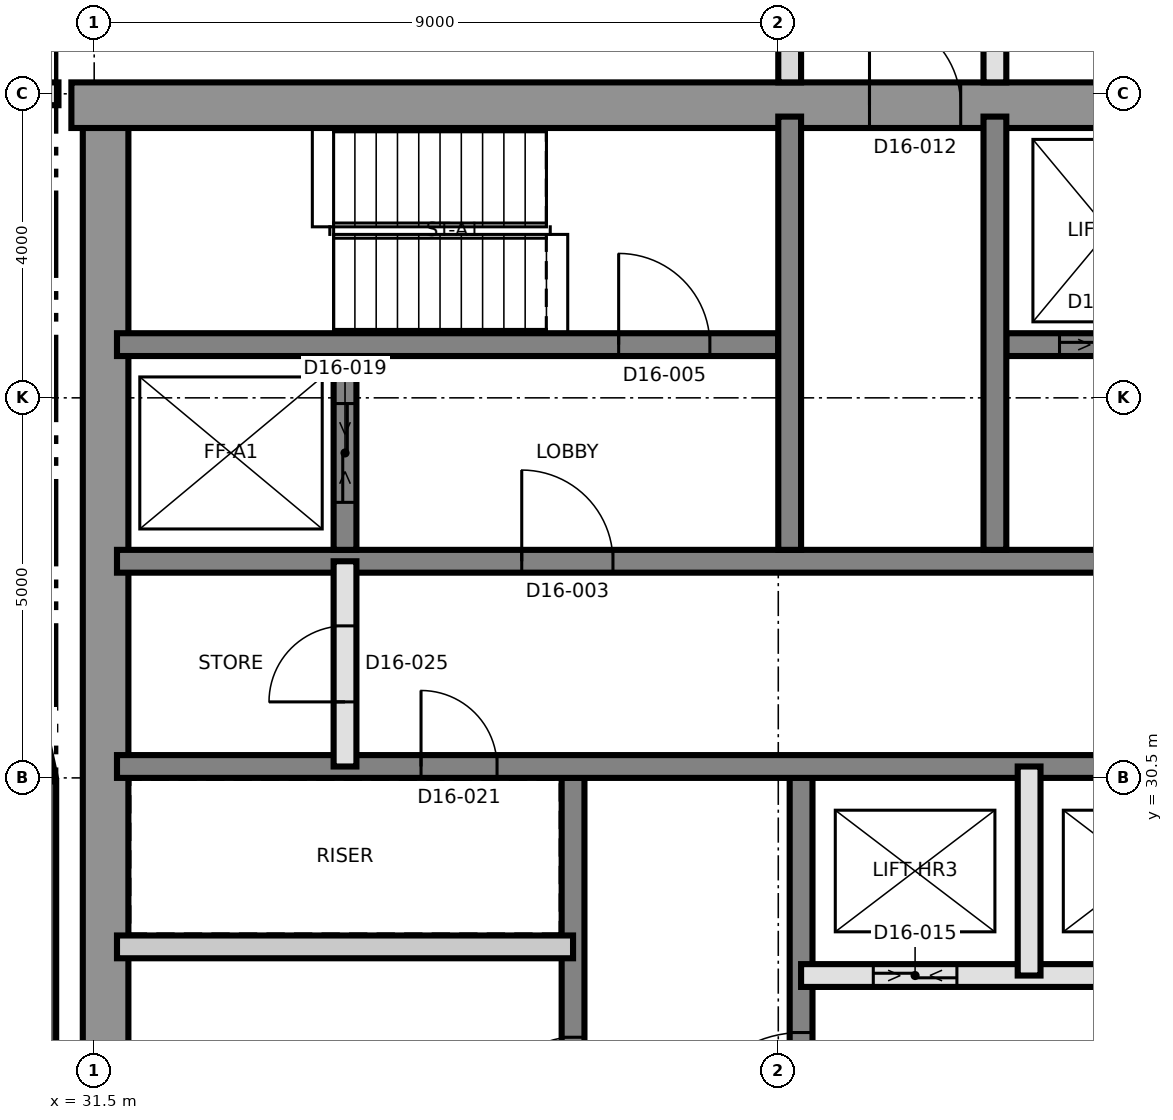
"""IFC4 building model, lengths in metres.
Left out: names, types, materials, properties, quantities, classifications, styles, units other than length and angle.
Written with IfcOpenShell. Run it as: python <this file> out.ifc"""

import sys

from ifc_helpers import new_model, si_unit, direction, frame, frame_2d, origin, place, context, subcontext, project, spatial, rectangle, extrude, element, fill, save


model = new_model("IFC4")
c1 = context("Model", 3, precision=1e-05, world=origin(), true_north=direction((0.0, 1.0)))
c2 = subcontext(c1, "Body", "Model", "MODEL_VIEW")
j1 = project(units=[si_unit("LENGTHUNIT", "METRE"), si_unit("PLANEANGLEUNIT", "RADIAN")], contexts=[c1])
p1 = place(None, origin())
s1 = spatial("IfcSite", under=j1, at=p1, CompositionType="ELEMENT")
p2 = place(p1, origin())
s2 = spatial("IfcBuilding", under=s1, at=p2, CompositionType="ELEMENT")
p3 = place(p2, frame((0.0, 0.0, 164.4)))
s3 = spatial("IfcBuildingStorey", under=s2, at=p3, CompositionType="ELEMENT", Elevation=164.4)
p4 = place(p3, frame((31.65, 21.8, 0.0), z_axis=(0.0, 0.0, 1.0), x_axis=(0.0, 1.0, 0.0)))
e1 = element("IfcWall", 1, at=p4, inside=s3, PredefinedType="SHEAR", context=c2, shape_type="SweptSolid", body=[
    extrude(rectangle(XDim=17.4, YDim=0.6, at=frame_2d((8.7, 0.0))), origin(), (0.0, 0.0, 1.0), 3.7),
])
p5 = place(p3, frame((31.2, 39.35, 0.0), z_axis=(0.0, 0.0, 1.0), x_axis=(1.0, 0.0, 0.0)))
e2 = element("IfcWall", 2, at=p5, inside=s3, PredefinedType="SHEAR", context=c2, shape_type="SweptSolid", body=[
    extrude(rectangle(XDim=27.0, YDim=0.6, at=frame_2d((13.5, 0.0))), origin(), (0.0, 0.0, 1.0), 3.7),
])
p6 = place(p5, frame((10.5, 0.0, 0.0)))
e3 = element("IfcOpeningElement", 3, at=p6, cuts=e2, PredefinedType="OPENING", context=c2, shape_type="SweptSolid", body=[
    extrude(rectangle(XDim=1.2, YDim=2.1, at=frame_2d((0.6, 1.05))), frame((0.0, 0.31, 0.0), z_axis=(0.0, -1.0, 0.0), x_axis=(1.0, 0.0, 0.0)), (0.0, 0.0, 1.0), 0.62),
])
p7 = place(p3, frame((37.8, 21.8, 0.0), z_axis=(0.0, 0.0, 1.0), x_axis=(0.0, 1.0, 0.0)))
e4 = element("IfcWall", 4, at=p7, inside=s3, PredefinedType="SHEAR", context=c2, shape_type="SweptSolid", body=[
    extrude(rectangle(XDim=8.7, YDim=0.3, at=frame_2d((4.35, 0.0))), origin(), (0.0, 0.0, 1.0), 3.7),
])
p8 = place(p7, frame((4.288, 0.0, 0.0)))
e5 = element("IfcOpeningElement", 5, at=p8, cuts=e4, PredefinedType="OPENING", context=c2, shape_type="SweptSolid", body=[
    extrude(rectangle(XDim=1.0, YDim=2.1, at=frame_2d((0.5, 1.05))), frame((0.0, 0.16, 0.0), z_axis=(0.0, -1.0, 0.0), x_axis=(1.0, 0.0, 0.0)), (0.0, 0.0, 1.0), 0.32),
])
p9 = place(p3, frame((40.8, 21.8, 0.0), z_axis=(0.0, 0.0, 1.0), x_axis=(0.0, 1.0, 0.0)))
e6 = element("IfcWall", 6, at=p9, inside=s3, PredefinedType="SHEAR", context=c2, shape_type="SweptSolid", body=[
    extrude(rectangle(XDim=8.7, YDim=0.3, at=frame_2d((4.35, 0.0))), origin(), (0.0, 0.0, 1.0), 3.7),
])
p10 = place(p9, frame((3.85, 0.0, 0.0)))
e7 = element("IfcOpeningElement", 7, at=p10, cuts=e6, PredefinedType="OPENING", context=c2, shape_type="SweptSolid", body=[
    extrude(rectangle(XDim=1.5, YDim=2.1, at=frame_2d((0.75, 1.05))), frame((0.0, 0.16, 0.0), z_axis=(0.0, -1.0, 0.0), x_axis=(1.0, 0.0, 0.0)), (0.0, 0.0, 1.0), 0.32),
])
p11 = place(p3, frame((31.8, 30.65, 0.0), z_axis=(0.0, 0.0, 1.0), x_axis=(1.0, 0.0, 0.0)))
e8 = element("IfcWall", 8, at=p11, inside=s3, PredefinedType="SHEAR", context=c2, shape_type="SweptSolid", body=[
    extrude(rectangle(XDim=26.4, YDim=0.3, at=frame_2d((13.2, 0.0))), origin(), (0.0, 0.0, 1.0), 3.7),
])
p12 = place(p11, frame((24.7, 0.0, 0.0)))
e9 = element("IfcOpeningElement", 9, at=p12, cuts=e8, PredefinedType="OPENING", context=c2, shape_type="SweptSolid", body=[
    extrude(rectangle(XDim=1.0, YDim=2.1, at=frame_2d((0.5, 1.05))), frame((0.0, 0.16, 0.0), z_axis=(0.0, -1.0, 0.0), x_axis=(1.0, 0.0, 0.0)), (0.0, 0.0, 1.0), 0.32),
])
p13 = place(p11, frame((4.0, 0.0, 0.0)))
e10 = element("IfcOpeningElement", 10, at=p13, cuts=e8, PredefinedType="OPENING", context=c2, shape_type="SweptSolid", body=[
    extrude(rectangle(XDim=1.0, YDim=2.1, at=frame_2d((0.5, 1.05))), frame((0.0, 0.16, 0.0), z_axis=(0.0, -1.0, 0.0), x_axis=(1.0, 0.0, 0.0)), (0.0, 0.0, 1.0), 0.32),
])
p14 = place(p3, frame((31.8, 33.35, 0.0), z_axis=(0.0, 0.0, 1.0), x_axis=(1.0, 0.0, 0.0)))
e11 = element("IfcWall", 11, at=p14, inside=s3, PredefinedType="SHEAR", context=c2, shape_type="SweptSolid", body=[
    extrude(rectangle(XDim=26.4, YDim=0.3, at=frame_2d((13.2, 0.0))), origin(), (0.0, 0.0, 1.0), 3.7),
])
p15 = place(p14, frame((13.85, 0.0, 0.0)))
e12 = element("IfcOpeningElement", 12, at=p15, cuts=e11, PredefinedType="OPENING", context=c2, shape_type="SweptSolid", body=[
    extrude(rectangle(XDim=1.4, YDim=2.1, at=frame_2d((0.7, 1.05))), frame((0.0, 0.16, 0.0), z_axis=(0.0, -1.0, 0.0), x_axis=(1.0, 0.0, 0.0)), (0.0, 0.0, 1.0), 0.32),
])
p16 = place(p14, frame((5.325, 0.0, 0.0)))
e13 = element("IfcOpeningElement", 13, at=p16, cuts=e11, PredefinedType="OPENING", context=c2, shape_type="SweptSolid", body=[
    extrude(rectangle(XDim=1.2, YDim=2.1, at=frame_2d((0.6, 1.05))), frame((0.0, 0.16, 0.0), z_axis=(0.0, -1.0, 0.0), x_axis=(1.0, 0.0, 0.0)), (0.0, 0.0, 1.0), 0.32),
])
p17 = place(p14, frame((19.875, 0.0, 0.0)))
e14 = element("IfcOpeningElement", 14, at=p17, cuts=e11, PredefinedType="OPENING", context=c2, shape_type="SweptSolid", body=[
    extrude(rectangle(XDim=1.2, YDim=2.1, at=frame_2d((0.6, 1.05))), frame((0.0, 0.16, 0.0), z_axis=(0.0, -1.0, 0.0), x_axis=(1.0, 0.0, 0.0)), (0.0, 0.0, 1.0), 0.32),
])
p18 = place(p3, frame((31.8, 36.2, 0.0), z_axis=(0.0, 0.0, 1.0), x_axis=(1.0, 0.0, 0.0)))
e15 = element("IfcWall", 15, at=p18, inside=s3, PredefinedType="SHEAR", context=c2, shape_type="SweptSolid", body=[
    extrude(rectangle(XDim=8.7, YDim=0.3, at=frame_2d((4.35, 0.0))), origin(), (0.0, 0.0, 1.0), 3.7),
])
p19 = place(p18, frame((6.6, 0.0, 0.0)))
e16 = element("IfcOpeningElement", 16, at=p19, cuts=e15, PredefinedType="OPENING", context=c2, shape_type="SweptSolid", body=[
    extrude(rectangle(XDim=1.2, YDim=2.1, at=frame_2d((0.6, 1.05))), frame((0.0, 0.16, 0.0), z_axis=(0.0, -1.0, 0.0), x_axis=(1.0, 0.0, 0.0)), (0.0, 0.0, 1.0), 0.32),
])
p20 = place(p3, frame((43.5, 36.2, 0.0), z_axis=(0.0, 0.0, 1.0), x_axis=(1.0, 0.0, 0.0)))
e17 = element("IfcWall", 17, at=p20, inside=s3, PredefinedType="SHEAR", context=c2, shape_type="SweptSolid", body=[
    extrude(rectangle(XDim=14.7, YDim=0.3, at=frame_2d((7.35, 0.0))), origin(), (0.0, 0.0, 1.0), 3.7),
])
p21 = place(p20, frame((6.9, 0.0, 0.0)))
e18 = element("IfcOpeningElement", 18, at=p21, cuts=e17, PredefinedType="OPENING", context=c2, shape_type="SweptSolid", body=[
    extrude(rectangle(XDim=1.2, YDim=2.1, at=frame_2d((0.6, 1.05))), frame((0.0, 0.16, 0.0), z_axis=(0.0, -1.0, 0.0), x_axis=(1.0, 0.0, 0.0)), (0.0, 0.0, 1.0), 0.32),
])
p22 = place(p20, frame((0.7, 0.0, 0.0)))
e19 = element("IfcOpeningElement", 19, at=p22, cuts=e17, PredefinedType="OPENING", context=c2, shape_type="SweptSolid", body=[
    extrude(rectangle(XDim=1.3, YDim=2.4, at=frame_2d((0.65, 1.2))), frame((0.0, 0.16, 0.0), z_axis=(0.0, -1.0, 0.0), x_axis=(1.0, 0.0, 0.0)), (0.0, 0.0, 1.0), 0.32),
])
p23 = place(p20, frame((3.7, 0.0, 0.0)))
e20 = element("IfcOpeningElement", 20, at=p23, cuts=e17, PredefinedType="OPENING", context=c2, shape_type="SweptSolid", body=[
    extrude(rectangle(XDim=1.3, YDim=2.4, at=frame_2d((0.65, 1.2))), frame((0.0, 0.16, 0.0), z_axis=(0.0, -1.0, 0.0), x_axis=(1.0, 0.0, 0.0)), (0.0, 0.0, 1.0), 0.32),
])
for number, where, z_axis, x_axis in (
    (21, (40.65, 33.5, 0.0), (0.0, 0.0, 1.0), (0.0, 1.0, 0.0)),
    (22, (43.35, 33.5, 0.0), (0.0, 0.0, 1.0), (0.0, 1.0, 0.0)),
):
    element("IfcWall", number, at=place(p3, frame(where, z_axis=z_axis, x_axis=x_axis)), inside=s3, PredefinedType="SHEAR", context=c2, shape_type="SweptSolid", body=[
        extrude(rectangle(XDim=5.7, YDim=0.3, at=frame_2d((2.85, 0.0))), origin(), (0.0, 0.0, 1.0), 3.7),
    ])
p24 = place(p3, frame((34.8, 33.5, 0.0), z_axis=(0.0, 0.0, 1.0), x_axis=(0.0, 1.0, 0.0)))
e23 = element("IfcWall", 23, at=p24, inside=s3, PredefinedType="SHEAR", context=c2, shape_type="SweptSolid", body=[
    extrude(rectangle(XDim=2.55, YDim=0.3, at=frame_2d((1.275, 0.0))), origin(), (0.0, 0.0, 1.0), 3.7),
])
p25 = place(p24, frame((0.625, 0.0, 0.0)))
e24 = element("IfcOpeningElement", 24, at=p25, cuts=e23, PredefinedType="OPENING", context=c2, shape_type="SweptSolid", body=[
    extrude(rectangle(XDim=1.3, YDim=2.4, at=frame_2d((0.65, 1.2))), frame((0.0, 0.16, 0.0), z_axis=(0.0, -1.0, 0.0), x_axis=(1.0, 0.0, 0.0)), (0.0, 0.0, 1.0), 0.32),
])
p26 = place(p3, frame((30.85, 30.454, 0.0), z_axis=(0.0, 0.0, 1.0), x_axis=(0.0, -1.0, 0.0)))
e25 = element("IfcWall", 25, at=p26, inside=s3, PredefinedType="SOLIDWALL", context=c2, shape_type="SweptSolid", body=[
    extrude(rectangle(XDim=9.094, YDim=0.3, at=frame_2d((4.547, 0.0))), origin(), (0.0, 0.0, 1.0), 3.4),
])
p27 = place(p3, frame((30.506, 32.049, 0.0), z_axis=(0.0, 0.0, 1.0), x_axis=(0.212695686462, -0.977118490747, 0.0)))
e26 = element("IfcWall", 26, at=p27, inside=s3, PredefinedType="SOLIDWALL", context=c2, shape_type="SweptSolid", body=[
    extrude(rectangle(XDim=1.6, YDim=0.3, at=frame_2d((0.8, 0.0))), origin(), (0.0, 0.0, 1.0), 3.4),
])
p28 = place(p3, frame((40.8, 27.9, 0.0), z_axis=(0.0, 0.0, 1.0), x_axis=(1.0, 0.0, 0.0)))
e27 = element("IfcWall", 27, at=p28, inside=s3, PredefinedType="SOLIDWALL", context=c2, shape_type="SweptSolid", body=[
    extrude(rectangle(XDim=6.0, YDim=0.3, at=frame_2d((3.0, 0.0))), origin(), (0.0, 0.0, 1.0), 3.4),
])
p29 = place(p28, frame((0.95, 0.0, 0.0)))
e28 = element("IfcOpeningElement", 28, at=p29, cuts=e27, PredefinedType="OPENING", context=c2, shape_type="SweptSolid", body=[
    extrude(rectangle(XDim=1.1, YDim=2.4, at=frame_2d((0.55, 1.2))), frame((0.0, 0.16, 0.0), z_axis=(0.0, -1.0, 0.0), x_axis=(1.0, 0.0, 0.0)), (0.0, 0.0, 1.0), 0.32),
])
p30 = place(p28, frame((3.95, 0.0, 0.0)))
e29 = element("IfcOpeningElement", 29, at=p30, cuts=e27, PredefinedType="OPENING", context=c2, shape_type="SweptSolid", body=[
    extrude(rectangle(XDim=1.1, YDim=2.4, at=frame_2d((0.55, 1.2))), frame((0.0, 0.16, 0.0), z_axis=(0.0, -1.0, 0.0), x_axis=(1.0, 0.0, 0.0)), (0.0, 0.0, 1.0), 0.32),
])
p31 = place(p3, frame((31.8, 28.277, 0.0), z_axis=(0.0, 0.0, 1.0), x_axis=(1.0, 0.0, 0.0)))
e30 = element("IfcWall", 30, at=p31, inside=s3, PredefinedType="PARTITIONING", context=c2, shape_type="SweptSolid", body=[
    extrude(rectangle(XDim=6.0, YDim=0.3, at=frame_2d((3.0, 0.0))), origin(), (0.0, 0.0, 1.0), 3.4),
])
p32 = place(p3, frame((34.8, 30.65, 0.0), z_axis=(0.0, 0.0, 1.0), x_axis=(0.0, 1.0, 0.0)))
e31 = element("IfcWall", 31, at=p32, inside=s3, PredefinedType="SOLIDWALL", context=c2, shape_type="SweptSolid", body=[
    extrude(rectangle(XDim=2.7, YDim=0.3, at=frame_2d((1.35, 0.0))), origin(), (0.0, 0.0, 1.0), 3.4),
])
p33 = place(p32, frame((0.85, 0.0, 0.0)))
e32 = element("IfcOpeningElement", 32, at=p33, cuts=e31, PredefinedType="OPENING", context=c2, shape_type="SweptSolid", body=[
    extrude(rectangle(XDim=1.0, YDim=2.1, at=frame_2d((0.5, 1.05))), frame((0.0, 0.16, 0.0), z_axis=(0.0, -1.0, 0.0), x_axis=(1.0, 0.0, 0.0)), (0.0, 0.0, 1.0), 0.32),
])
p34 = place(p3, frame((43.8, 27.9, 0.0), z_axis=(0.0, 0.0, 1.0), x_axis=(0.0, 1.0, 0.0)))
e33 = element("IfcWall", 33, at=p34, inside=s3, PredefinedType="SOLIDWALL", context=c2, shape_type="SweptSolid", body=[
    extrude(rectangle(XDim=2.75, YDim=0.3, at=frame_2d((1.375, 0.0))), origin(), (0.0, 0.0, 1.0), 3.4),
])
p35 = place(p3, frame((30.565, 39.5, 0.0), z_axis=(0.0, 0.0, 1.0), x_axis=(1.0, 0.0, 0.0)))
e34 = element("IfcWall", 34, at=p35, inside=s3, PredefinedType="PARTITIONING", context=c2, shape_type="SweptSolid", body=[
    extrude(rectangle(XDim=0.465, YDim=0.3, at=frame_2d((0.232, 0.0))), origin(), (0.0, 0.0, 1.0), 3.4),
])
p36 = place(p3, frame((40.65, 39.65, 0.0), z_axis=(0.0, 0.0, 1.0), x_axis=(0.0, 1.0, 0.0)))
e35 = element("IfcWall", 35, at=p36, inside=s3, PredefinedType="PARTITIONING", context=c2, shape_type="SweptSolid", body=[
    extrude(rectangle(XDim=37.025, YDim=0.3, at=frame_2d((18.513, 0.0))), origin(), (0.0, 0.0, 1.0), 3.4),
])
p37 = place(p36, frame((1.0, 0.0, 0.0)))
e36 = element("IfcOpeningElement", 36, at=p37, cuts=e35, PredefinedType="OPENING", context=c2, shape_type="SweptSolid", body=[
    extrude(rectangle(XDim=1.0, YDim=2.1, at=frame_2d((0.5, 1.05))), frame((0.0, 0.16, 0.0), z_axis=(0.0, -1.0, 0.0), x_axis=(1.0, 0.0, 0.0)), (0.0, 0.0, 1.0), 0.32),
])
p38 = place(p36, frame((6.85, 0.0, 0.0)))
e37 = element("IfcOpeningElement", 37, at=p38, cuts=e35, PredefinedType="OPENING", context=c2, shape_type="SweptSolid", body=[
    extrude(rectangle(XDim=1.0, YDim=2.1, at=frame_2d((0.5, 1.05))), frame((0.0, 0.16, 0.0), z_axis=(0.0, -1.0, 0.0), x_axis=(1.0, 0.0, 0.0)), (0.0, 0.0, 1.0), 0.32),
])
p39 = place(p36, frame((14.5, 0.0, 0.0)))
e38 = element("IfcOpeningElement", 38, at=p39, cuts=e35, PredefinedType="OPENING", context=c2, shape_type="SweptSolid", body=[
    extrude(rectangle(XDim=1.0, YDim=2.4, at=frame_2d((0.5, 1.2))), frame((0.0, 0.16, 0.0), z_axis=(0.0, -1.0, 0.0), x_axis=(1.0, 0.0, 0.0)), (0.0, 0.0, 1.0), 0.32),
])
p40 = place(p36, frame((21.35, 0.0, 0.0)))
e39 = element("IfcOpeningElement", 39, at=p40, cuts=e35, PredefinedType="OPENING", context=c2, shape_type="SweptSolid", body=[
    extrude(rectangle(XDim=1.0, YDim=2.4, at=frame_2d((0.5, 1.2))), frame((0.0, 0.16, 0.0), z_axis=(0.0, -1.0, 0.0), x_axis=(1.0, 0.0, 0.0)), (0.0, 0.0, 1.0), 0.32),
])
p41 = place(p3, frame((43.35, 39.65, 0.0), z_axis=(0.0, 0.0, 1.0), x_axis=(0.0, 1.0, 0.0)))
e40 = element("IfcWall", 40, at=p41, inside=s3, PredefinedType="SOLIDWALL", context=c2, shape_type="SweptSolid", body=[
    extrude(rectangle(XDim=26.1, YDim=0.3, at=frame_2d((13.05, 0.0))), origin(), (0.0, 0.0, 1.0), 3.4),
])
p42 = place(p41, frame((0.985, 0.0, 0.0)))
e41 = element("IfcOpeningElement", 41, at=p42, cuts=e40, PredefinedType="OPENING", context=c2, shape_type="SweptSolid", body=[
    extrude(rectangle(XDim=1.2, YDim=2.1, at=frame_2d((0.6, 1.05))), frame((0.0, 0.16, 0.0), z_axis=(0.0, -1.0, 0.0), x_axis=(1.0, 0.0, 0.0)), (0.0, 0.0, 1.0), 0.32),
])
p43 = place(p41, frame((4.235, 0.0, 0.0)))
e42 = element("IfcOpeningElement", 42, at=p43, cuts=e40, PredefinedType="OPENING", context=c2, shape_type="SweptSolid", body=[
    extrude(rectangle(XDim=1.0, YDim=2.1, at=frame_2d((0.5, 1.05))), frame((0.0, 0.16, 0.0), z_axis=(0.0, -1.0, 0.0), x_axis=(1.0, 0.0, 0.0)), (0.0, 0.0, 1.0), 0.32),
])
p44 = place(p41, frame((9.7, 0.0, 0.0)))
e43 = element("IfcOpeningElement", 43, at=p44, cuts=e40, PredefinedType="OPENING", context=c2, shape_type="SweptSolid", body=[
    extrude(rectangle(XDim=1.0, YDim=2.1, at=frame_2d((0.5, 1.05))), frame((0.0, 0.16, 0.0), z_axis=(0.0, -1.0, 0.0), x_axis=(1.0, 0.0, 0.0)), (0.0, 0.0, 1.0), 0.32),
])
p45 = place(p41, frame((15.55, 0.0, 0.0)))
e44 = element("IfcOpeningElement", 44, at=p45, cuts=e40, PredefinedType="OPENING", context=c2, shape_type="SweptSolid", body=[
    extrude(rectangle(XDim=1.0, YDim=2.1, at=frame_2d((0.5, 1.05))), frame((0.0, 0.16, 0.0), z_axis=(0.0, -1.0, 0.0), x_axis=(1.0, 0.0, 0.0)), (0.0, 0.0, 1.0), 0.32),
])
p46 = place(p41, frame((19.85, 0.0, 0.0)))
e45 = element("IfcOpeningElement", 45, at=p46, cuts=e40, PredefinedType="OPENING", context=c2, shape_type="SweptSolid", body=[
    extrude(rectangle(XDim=1.0, YDim=2.4, at=frame_2d((0.5, 1.2))), frame((0.0, 0.16, 0.0), z_axis=(0.0, -1.0, 0.0), x_axis=(1.0, 0.0, 0.0)), (0.0, 0.0, 1.0), 0.32),
])
p47 = place(p10, origin())
e46 = element("IfcDoor", 46, at=p47, inside=s3, OperationType="SINGLE_SWING_RIGHT", PredefinedType="DOOR", context=c2, shape_type="SweptSolid", body=[
    extrude(rectangle(XDim=1.5, YDim=2.1, at=frame_2d((0.75, 1.05))), frame((0.0, 0.025, 0.0), z_axis=(0.0, -1.0, 0.0), x_axis=(1.0, 0.0, 0.0)), (0.0, 0.0, 1.0), 0.05),
])
fill(e7, e46)
p48 = place(p16, origin())
e47 = element("IfcDoor", 47, at=p48, inside=s3, OperationType="SINGLE_SWING_LEFT", PredefinedType="DOOR", context=c2, shape_type="SweptSolid", body=[
    extrude(rectangle(XDim=1.2, YDim=2.1, at=frame_2d((0.6, 1.05))), frame((0.0, 0.025, 0.0), z_axis=(0.0, -1.0, 0.0), x_axis=(1.0, 0.0, 0.0)), (0.0, 0.0, 1.0), 0.05),
])
fill(e13, e47)
p49 = place(p19, origin())
e48 = element("IfcDoor", 48, at=p49, inside=s3, OperationType="SINGLE_SWING_RIGHT", PredefinedType="DOOR", context=c2, shape_type="SweptSolid", body=[
    extrude(rectangle(XDim=1.2, YDim=2.1, at=frame_2d((0.6, 1.05))), frame((0.0, 0.025, 0.0), z_axis=(0.0, -1.0, 0.0), x_axis=(1.0, 0.0, 0.0)), (0.0, 0.0, 1.0), 0.05),
])
fill(e16, e48)
p50 = place(p6, origin())
e49 = element("IfcDoor", 49, at=p50, inside=s3, OperationType="SINGLE_SWING_RIGHT", PredefinedType="DOOR", context=c2, shape_type="SweptSolid", body=[
    extrude(rectangle(XDim=1.2, YDim=2.1, at=frame_2d((0.6, 1.05))), frame((0.0, 0.025, 0.0), z_axis=(0.0, -1.0, 0.0), x_axis=(1.0, 0.0, 0.0)), (0.0, 0.0, 1.0), 0.05),
])
fill(e3, e49)
p51 = place(p29, origin())
e50 = element("IfcDoor", 50, at=p51, inside=s3, OperationType="SLIDING_TO_LEFT", PredefinedType="DOOR", context=c2, shape_type="SweptSolid", body=[
    extrude(rectangle(XDim=1.1, YDim=2.4, at=frame_2d((0.55, 1.2))), frame((0.0, 0.025, 0.0), z_axis=(0.0, -1.0, 0.0), x_axis=(1.0, 0.0, 0.0)), (0.0, 0.0, 1.0), 0.05),
])
fill(e28, e50)
p52 = place(p22, origin())
e51 = element("IfcDoor", 51, at=p52, inside=s3, OperationType="SLIDING_TO_LEFT", PredefinedType="DOOR", context=c2, shape_type="SweptSolid", body=[
    extrude(rectangle(XDim=1.3, YDim=2.4, at=frame_2d((0.65, 1.2))), frame((0.0, 0.025, 0.0), z_axis=(0.0, -1.0, 0.0), x_axis=(1.0, 0.0, 0.0)), (0.0, 0.0, 1.0), 0.05),
])
fill(e19, e51)
p53 = place(p25, origin())
e52 = element("IfcDoor", 52, at=p53, inside=s3, OperationType="SLIDING_TO_LEFT", PredefinedType="DOOR", context=c2, shape_type="SweptSolid", body=[
    extrude(rectangle(XDim=1.3, YDim=2.4, at=frame_2d((0.65, 1.2))), frame((0.0, 0.025, 0.0), z_axis=(0.0, -1.0, 0.0), x_axis=(1.0, 0.0, 0.0)), (0.0, 0.0, 1.0), 0.05),
])
fill(e24, e52)
p54 = place(p13, origin())
e53 = element("IfcDoor", 53, at=p54, inside=s3, OperationType="SINGLE_SWING_LEFT", PredefinedType="DOOR", context=c2, shape_type="SweptSolid", body=[
    extrude(rectangle(XDim=1.0, YDim=2.1, at=frame_2d((0.5, 1.05))), frame((0.0, 0.025, 0.0), z_axis=(0.0, -1.0, 0.0), x_axis=(1.0, 0.0, 0.0)), (0.0, 0.0, 1.0), 0.05),
])
fill(e10, e53)
p55 = place(p8, origin())
e54 = element("IfcDoor", 54, at=p55, inside=s3, OperationType="SINGLE_SWING_RIGHT", PredefinedType="DOOR", context=c2, shape_type="SweptSolid", body=[
    extrude(rectangle(XDim=1.0, YDim=2.1, at=frame_2d((0.5, 1.05))), frame((0.0, 0.025, 0.0), z_axis=(0.0, -1.0, 0.0), x_axis=(1.0, 0.0, 0.0)), (0.0, 0.0, 1.0), 0.05),
])
fill(e5, e54)
p56 = place(p33, origin())
e55 = element("IfcDoor", 55, at=p56, inside=s3, OperationType="SINGLE_SWING_LEFT", PredefinedType="DOOR", context=c2, shape_type="SweptSolid", body=[
    extrude(rectangle(XDim=1.0, YDim=2.1, at=frame_2d((0.5, 1.05))), frame((0.0, 0.025, 0.0), z_axis=(0.0, -1.0, 0.0), x_axis=(1.0, 0.0, 0.0)), (0.0, 0.0, 1.0), 0.05),
])
fill(e32, e55)
save(model, sys.argv[1])
